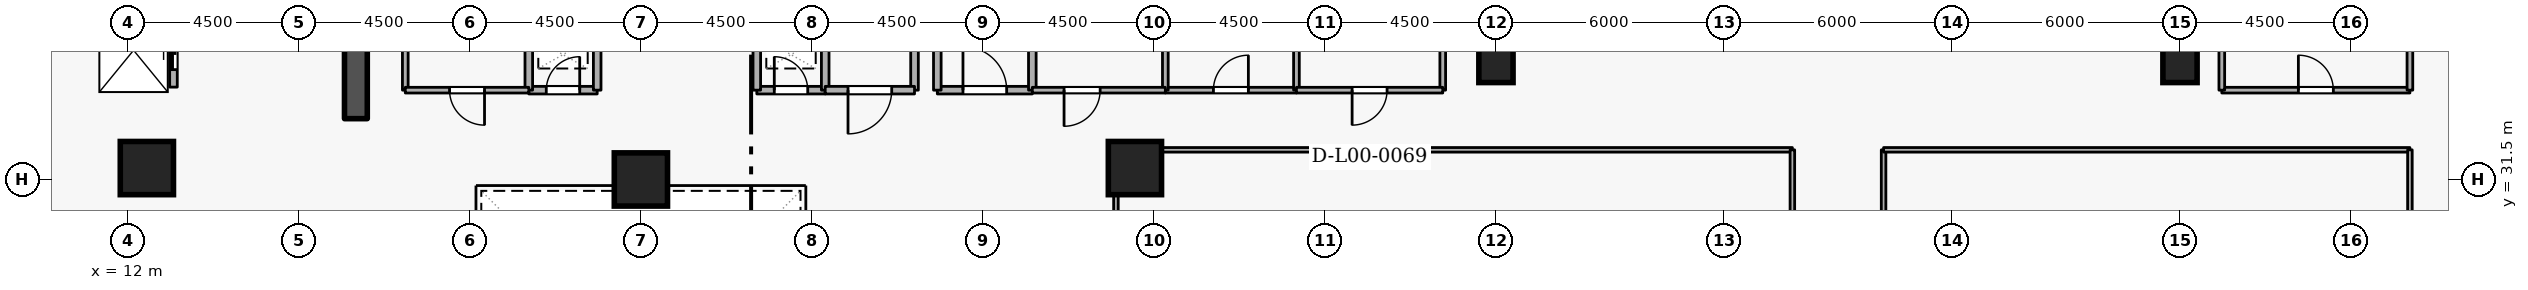
"""IFC4 building model, lengths in metres.
Left out: names, types, materials, properties, quantities, classifications, styles, units other than length and angle.
Written with IfcOpenShell. Run it as: python <this file> out.ifc"""

import sys

from ifc_helpers import new_model, si_unit, direction, frame, frame_2d, origin, origin_2d, place, context, subcontext, project, spatial, rectangle, extrude, element, fill, save


model = new_model("IFC4")
c1 = context("Model", 3, precision=1e-05, world=origin(), true_north=direction((0.0, 1.0)))
c2 = subcontext(c1, "Body", "Model", "MODEL_VIEW")
j1 = project(units=[si_unit("LENGTHUNIT", "METRE"), si_unit("PLANEANGLEUNIT", "RADIAN")], contexts=[c1])
p1 = place(None, origin())
s1 = spatial("IfcSite", under=j1, at=p1, CompositionType="ELEMENT")
p2 = place(p1, origin())
s2 = spatial("IfcBuilding", under=s1, at=p2, CompositionType="ELEMENT")
p3 = place(p2, origin())
s3 = spatial("IfcBuildingStorey", under=s2, at=p3, CompositionType="ELEMENT", Elevation=0.0)
p4 = place(p3, frame((18.0, 33.1, 0.0), z_axis=(0.0, 0.0, 1.0), x_axis=(0.0, 1.0, 0.0)))
e1 = element("IfcWall", 1, at=p4, inside=s3, PredefinedType="SHEAR", context=c2, shape_type="SweptSolid", body=[
    extrude(rectangle(XDim=5.7, YDim=0.6, at=frame_2d((2.85, 0.0))), origin(), (0.0, 0.0, 1.0), 4.8),
])
for number, where, z_axis, x_axis in (
    (2, (12.5, 31.8, 0.0), (0.0, 0.0, 1.0), (1.0, 0.0, 0.0)),
    (3, (38.5, 31.8, 0.0), (0.0, 0.0, 1.0), (1.0, 0.0, 0.0)),
    (4, (25.5, 31.5, 0.0), (0.0, 0.0, 1.0), (1.0, 0.0, 0.0)),
):
    element("IfcColumn", number, at=place(p3, frame(where, z_axis=z_axis, x_axis=x_axis)), inside=s3, PredefinedType="COLUMN", context=c2, shape_type="SweptSolid", body=[
        extrude(rectangle(XDim=1.4, YDim=1.4, at=origin_2d()), origin(), (0.0, 0.0, 1.0), 4.8),
    ])
for number, where, z_axis, x_axis in (
    (5, (48.0, 34.5, 0.0), (0.0, 0.0, 1.0), (1.0, 0.0, 0.0)),
    (6, (66.0, 34.5, 0.0), (0.0, 0.0, 1.0), (1.0, 0.0, 0.0)),
):
    element("IfcColumn", number, at=place(p3, frame(where, z_axis=z_axis, x_axis=x_axis)), inside=s3, PredefinedType="COLUMN", context=c2, shape_type="SweptSolid", body=[
        extrude(rectangle(XDim=0.9, YDim=0.9, at=origin_2d()), origin(), (0.0, 0.0, 1.0), 4.8),
    ])
p5 = place(p3, frame((13.2, 33.93, 0.0), z_axis=(0.0, 0.0, 1.0), x_axis=(0.0, 1.0, 0.0)))
e7 = element("IfcWall", 7, at=p5, inside=s3, PredefinedType="STANDARD", context=c2, shape_type="SweptSolid", body=[
    extrude(rectangle(XDim=1.94, YDim=0.2, at=frame_2d((0.97, 0.0))), origin(), (0.0, 0.0, 1.0), 4.46),
])
p6 = place(p5, frame((0.46, 0.0, 0.0)))
e8 = element("IfcOpeningElement", 8, at=p6, cuts=e7, PredefinedType="OPENING", context=c2, shape_type="SweptSolid", body=[
    extrude(rectangle(XDim=1.02, YDim=2.06, at=frame_2d((0.51, 1.03))), frame((0.0, 0.11, 0.0), z_axis=(0.0, -1.0, 0.0), x_axis=(1.0, 0.0, 0.0)), (0.0, 0.0, 1.0), 0.22),
])
p7 = place(p3, frame((33.3, 33.85, 0.0), z_axis=(0.0, 0.0, 1.0), x_axis=(1.0, 0.0, 0.0)))
e9 = element("IfcWall", 9, at=p7, inside=s3, PredefinedType="STANDARD", context=c2, shape_type="SweptSolid", body=[
    extrude(rectangle(XDim=2.5, YDim=0.2, at=frame_2d((1.25, 0.0))), origin(), (0.0, 0.0, 1.0), 4.46),
])
p8 = place(p7, frame((0.675, 0.0, 0.0)))
e10 = element("IfcOpeningElement", 10, at=p8, cuts=e9, PredefinedType="OPENING", context=c2, shape_type="SweptSolid", body=[
    extrude(rectangle(XDim=1.15, YDim=2.1, at=frame_2d((0.575, 1.05))), frame((0.0, 0.11, 0.0), z_axis=(0.0, -1.0, 0.0), x_axis=(1.0, 0.0, 0.0)), (0.0, 0.0, 1.0), 0.22),
])
p9 = place(p3, frame((35.8, 33.85, 0.0), z_axis=(0.0, 0.0, 1.0), x_axis=(0.0, 1.0, 0.0)))
e11 = element("IfcWall", 11, at=p9, inside=s3, PredefinedType="STANDARD", context=c2, shape_type="SweptSolid", body=[
    extrude(rectangle(XDim=5.15, YDim=0.2, at=frame_2d((2.575, 0.0))), origin(), (0.0, 0.0, 1.0), 4.46),
])
p10 = place(p3, frame((33.3, 35.6, 0.0), z_axis=(0.0, 0.0, 1.0), x_axis=(0.0, -1.0, 0.0)))
e12 = element("IfcWall", 12, at=p10, inside=s3, PredefinedType="STANDARD", context=c2, shape_type="SweptSolid", body=[
    extrude(rectangle(XDim=1.75, YDim=0.2, at=frame_2d((0.875, 0.0))), origin(), (0.0, 0.0, 1.0), 3.665),
])
p11 = place(p3, frame((22.55, 33.85, 0.0), z_axis=(0.0, 0.0, 1.0), x_axis=(1.0, 0.0, 0.0)))
e13 = element("IfcWall", 13, at=p11, inside=s3, PredefinedType="STANDARD", context=c2, shape_type="SweptSolid", body=[
    extrude(rectangle(XDim=1.8, YDim=0.2, at=frame_2d((0.9, 0.0))), origin(), (0.0, 0.0, 1.0), 4.46),
])
p12 = place(p11, frame((0.46, 0.0, 0.0)))
e14 = element("IfcOpeningElement", 14, at=p12, cuts=e13, PredefinedType="OPENING", context=c2, shape_type="SweptSolid", body=[
    extrude(rectangle(XDim=0.88, YDim=2.04, at=frame_2d((0.44, 1.02))), frame((0.0, 0.11, 0.0), z_axis=(0.0, -1.0, 0.0), x_axis=(1.0, 0.0, 0.0)), (0.0, 0.0, 1.0), 0.22),
])
for number, where, z_axis, x_axis in (
    (15, (24.35, 33.85, 0.0), (0.0, 0.0, 1.0), (0.0, 1.0, 0.0)),
    (16, (22.55, 35.35, 0.0), (0.0, 0.0, 1.0), (0.0, -1.0, 0.0)),
):
    element("IfcWall", number, at=place(p3, frame(where, z_axis=z_axis, x_axis=x_axis)), inside=s3, PredefinedType="STANDARD", context=c2, shape_type="SweptSolid", body=[
        extrude(rectangle(XDim=1.5, YDim=0.2, at=frame_2d((0.75, 0.0))), origin(), (0.0, 0.0, 1.0), 4.46),
    ])
p13 = place(p3, frame((28.55, 33.85, 0.0), z_axis=(0.0, 0.0, 1.0), x_axis=(1.0, 0.0, 0.0)))
e17 = element("IfcWall", 17, at=p13, inside=s3, PredefinedType="STANDARD", context=c2, shape_type="SweptSolid", body=[
    extrude(rectangle(XDim=1.8, YDim=0.2, at=frame_2d((0.9, 0.0))), origin(), (0.0, 0.0, 1.0), 4.46),
])
p14 = place(p13, frame((0.46, 0.0, 0.0)))
e18 = element("IfcOpeningElement", 18, at=p14, cuts=e17, PredefinedType="OPENING", context=c2, shape_type="SweptSolid", body=[
    extrude(rectangle(XDim=0.88, YDim=2.04, at=frame_2d((0.44, 1.02))), frame((0.0, 0.11, 0.0), z_axis=(0.0, -1.0, 0.0), x_axis=(1.0, 0.0, 0.0)), (0.0, 0.0, 1.0), 0.22),
])
for number, where, z_axis, x_axis in (
    (19, (30.35, 33.85, 0.0), (0.0, 0.0, 1.0), (0.0, 1.0, 0.0)),
    (20, (28.55, 35.35, 0.0), (0.0, 0.0, 1.0), (0.0, -1.0, 0.0)),
):
    element("IfcWall", number, at=place(p3, frame(where, z_axis=z_axis, x_axis=x_axis)), inside=s3, PredefinedType="STANDARD", context=c2, shape_type="SweptSolid", body=[
        extrude(rectangle(XDim=1.5, YDim=0.2, at=frame_2d((0.75, 0.0))), origin(), (0.0, 0.0, 1.0), 4.46),
    ])
p15 = place(p3, frame((32.7, 35.35, 0.0), z_axis=(0.0, 0.0, 1.0), x_axis=(0.0, -1.0, 0.0)))
e21 = element("IfcWall", 21, at=p15, inside=s3, PredefinedType="STANDARD", context=c2, shape_type="SweptSolid", body=[
    extrude(rectangle(XDim=1.5, YDim=0.2, at=frame_2d((0.75, 0.0))), origin(), (0.0, 0.0, 1.0), 3.665),
])
p16 = place(p3, frame((32.7, 33.85, 0.0), z_axis=(0.0, 0.0, 1.0), x_axis=(-1.0, 0.0, 0.0)))
e22 = element("IfcWall", 22, at=p16, inside=s3, PredefinedType="STANDARD", context=c2, shape_type="SweptSolid", body=[
    extrude(rectangle(XDim=2.35, YDim=0.2, at=frame_2d((1.175, 0.0))), origin(), (0.0, 0.0, 1.0), 4.46),
])
p17 = place(p16, frame((0.6, 0.0, 0.0)))
e23 = element("IfcOpeningElement", 23, at=p17, cuts=e22, PredefinedType="OPENING", context=c2, shape_type="SweptSolid", body=[
    extrude(rectangle(XDim=1.15, YDim=2.1, at=frame_2d((0.575, 1.05))), frame((0.0, 0.11, 0.0), z_axis=(0.0, -1.0, 0.0), x_axis=(1.0, 0.0, 0.0)), (0.0, 0.0, 1.0), 0.22),
])
p18 = place(p3, frame((19.3, 33.85, 0.0), z_axis=(0.0, 0.0, 1.0), x_axis=(0.0, 1.0, 0.0)))
e24 = element("IfcWall", 24, at=p18, inside=s3, PredefinedType="PARTITIONING", context=c2, shape_type="SweptSolid", body=[
    extrude(rectangle(XDim=1.5, YDim=0.15, at=frame_2d((0.75, 0.0))), origin(), (0.0, 0.0, 1.0), 4.46),
])
p19 = place(p3, frame((22.55, 33.85, 0.0), z_axis=(0.0, 0.0, 1.0), x_axis=(-1.0, 0.0, 0.0)))
e25 = element("IfcWall", 25, at=p19, inside=s3, PredefinedType="PARTITIONING", context=c2, shape_type="SweptSolid", body=[
    extrude(rectangle(XDim=3.25, YDim=0.15, at=frame_2d((1.625, 0.0))), origin(), (0.0, 0.0, 1.0), 4.46),
])
p20 = place(p19, frame((1.165, 0.0, 0.0)))
e26 = element("IfcOpeningElement", 26, at=p20, cuts=e25, PredefinedType="OPENING", context=c2, shape_type="SweptSolid", body=[
    extrude(rectangle(XDim=0.92, YDim=2.08, at=frame_2d((0.46, 1.04))), frame((0.0, 0.085, 0.0), z_axis=(0.0, -1.0, 0.0), x_axis=(1.0, 0.0, 0.0)), (0.0, 0.0, 1.0), 0.17),
])
p21 = place(p3, frame((39.3, 33.85, 0.0), z_axis=(0.0, 0.0, 1.0), x_axis=(1.0, 0.0, 0.0)))
e27 = element("IfcWall", 27, at=p21, inside=s3, PredefinedType="PARTITIONING", context=c2, shape_type="SweptSolid", body=[
    extrude(rectangle(XDim=3.45, YDim=0.15, at=frame_2d((1.725, 0.0))), origin(), (0.0, 0.0, 1.0), 4.46),
])
p22 = place(p21, frame((1.265, 0.0, 0.0)))
e28 = element("IfcOpeningElement", 28, at=p22, cuts=e27, PredefinedType="OPENING", context=c2, shape_type="SweptSolid", body=[
    extrude(rectangle(XDim=0.92, YDim=2.08, at=frame_2d((0.46, 1.04))), frame((0.0, 0.085, 0.0), z_axis=(0.0, -1.0, 0.0), x_axis=(1.0, 0.0, 0.0)), (0.0, 0.0, 1.0), 0.17),
])
p23 = place(p3, frame((42.75, 33.85, 0.0), z_axis=(0.0, 0.0, 1.0), x_axis=(0.0, 1.0, 0.0)))
e29 = element("IfcWall", 29, at=p23, inside=s3, PredefinedType="PARTITIONING", context=c2, shape_type="SweptSolid", body=[
    extrude(rectangle(XDim=3.95, YDim=0.15, at=frame_2d((1.975, 0.0))), origin(), (0.0, 0.0, 1.0), 3.538),
])
p24 = place(p3, frame((39.3, 37.8, 0.0), z_axis=(0.0, 0.0, 1.0), x_axis=(0.0, -1.0, 0.0)))
e30 = element("IfcWall", 30, at=p24, inside=s3, PredefinedType="PARTITIONING", context=c2, shape_type="SweptSolid", body=[
    extrude(rectangle(XDim=3.95, YDim=0.15, at=frame_2d((1.975, 0.0))), origin(), (0.0, 0.0, 1.0), 4.46),
])
p25 = place(p3, frame((67.1, 33.85, 0.0), z_axis=(0.0, 0.0, 1.0), x_axis=(1.0, 0.0, 0.0)))
e31 = element("IfcWall", 31, at=p25, inside=s3, PredefinedType="PARTITIONING", context=c2, shape_type="SweptSolid", body=[
    extrude(rectangle(XDim=4.95, YDim=0.15, at=frame_2d((2.475, 0.0))), origin(), (0.0, 0.0, 1.0), 4.46),
])
p26 = place(p25, frame((2.015, 0.0, 0.0)))
e32 = element("IfcOpeningElement", 32, at=p26, cuts=e31, PredefinedType="OPENING", context=c2, shape_type="SweptSolid", body=[
    extrude(rectangle(XDim=0.92, YDim=2.08, at=frame_2d((0.46, 1.04))), frame((0.0, 0.085, 0.0), z_axis=(0.0, -1.0, 0.0), x_axis=(1.0, 0.0, 0.0)), (0.0, 0.0, 1.0), 0.17),
])
for number, where, z_axis, x_axis in (
    (33, (72.05, 33.85, 0.0), (0.0, 0.0, 1.0), (0.0, 1.0, 0.0)),
    (34, (67.1, 37.8, 0.0), (0.0, 0.0, 1.0), (0.0, -1.0, 0.0)),
    (35, (46.6, 37.8, 0.0), (0.0, 0.0, 1.0), (0.0, -1.0, 0.0)),
):
    element("IfcWall", number, at=place(p3, frame(where, z_axis=z_axis, x_axis=x_axis)), inside=s3, PredefinedType="PARTITIONING", context=c2, shape_type="SweptSolid", body=[
        extrude(rectangle(XDim=3.95, YDim=0.15, at=frame_2d((1.975, 0.0))), origin(), (0.0, 0.0, 1.0), 4.46),
    ])
p27 = place(p3, frame((46.6, 33.85, 0.0), z_axis=(0.0, 0.0, 1.0), x_axis=(-1.0, 0.0, 0.0)))
e36 = element("IfcWall", 36, at=p27, inside=s3, PredefinedType="PARTITIONING", context=c2, shape_type="SweptSolid", body=[
    extrude(rectangle(XDim=3.85, YDim=0.15, at=frame_2d((1.925, 0.0))), origin(), (0.0, 0.0, 1.0), 4.46),
])
p28 = place(p27, frame((1.465, 0.0, 0.0)))
e37 = element("IfcOpeningElement", 37, at=p28, cuts=e36, PredefinedType="OPENING", context=c2, shape_type="SweptSolid", body=[
    extrude(rectangle(XDim=0.92, YDim=2.08, at=frame_2d((0.46, 1.04))), frame((0.0, 0.085, 0.0), z_axis=(0.0, -1.0, 0.0), x_axis=(1.0, 0.0, 0.0)), (0.0, 0.0, 1.0), 0.17),
])
p29 = place(p3, frame((38.0, 22.3, 0.0), z_axis=(0.0, 0.0, 1.0), x_axis=(0.0, 1.0, 0.0)))
e38 = element("IfcWall", 38, at=p29, inside=s3, PredefinedType="PARTITIONING", context=c2, shape_type="SweptSolid", body=[
    extrude(rectangle(XDim=9.98, YDim=0.12, at=frame_2d((4.99, 0.0))), origin(), (0.0, 0.0, 1.0), 4.46),
])
p30 = place(p3, frame((38.0, 32.28, 0.0), z_axis=(0.0, 0.0, 1.0), x_axis=(1.0, 0.0, 0.0)))
e39 = element("IfcWall", 39, at=p30, inside=s3, PredefinedType="PARTITIONING", context=c2, shape_type="SweptSolid", body=[
    extrude(rectangle(XDim=17.8, YDim=0.12, at=frame_2d((8.9, 0.0))), origin(), (0.0, 0.0, 1.0), 4.46),
])
for number, where, z_axis, x_axis in (
    (40, (55.8, 32.28, 0.0), (0.0, 0.0, 1.0), (0.0, -1.0, 0.0)),
    (41, (58.2, 22.3, 0.0), (0.0, 0.0, 1.0), (0.0, 1.0, 0.0)),
):
    element("IfcWall", number, at=place(p3, frame(where, z_axis=z_axis, x_axis=x_axis)), inside=s3, PredefinedType="PARTITIONING", context=c2, shape_type="SweptSolid", body=[
        extrude(rectangle(XDim=9.98, YDim=0.12, at=frame_2d((4.99, 0.0))), origin(), (0.0, 0.0, 1.0), 4.46),
    ])
p31 = place(p3, frame((58.2, 32.28, 0.0), z_axis=(0.0, 0.0, 1.0), x_axis=(1.0, 0.0, 0.0)))
e42 = element("IfcWall", 42, at=p31, inside=s3, PredefinedType="PARTITIONING", context=c2, shape_type="SweptSolid", body=[
    extrude(rectangle(XDim=13.85, YDim=0.12, at=frame_2d((6.925, 0.0))), origin(), (0.0, 0.0, 1.0), 4.46),
])
p32 = place(p3, frame((72.05, 32.28, 0.0), z_axis=(0.0, 0.0, 1.0), x_axis=(0.0, -1.0, 0.0)))
e43 = element("IfcWall", 43, at=p32, inside=s3, PredefinedType="PARTITIONING", context=c2, shape_type="SweptSolid", body=[
    extrude(rectangle(XDim=9.98, YDim=0.12, at=frame_2d((4.99, 0.0))), origin(), (0.0, 0.0, 1.0), 4.46),
])
p33 = place(p3, frame((39.3, 33.85, 0.0), z_axis=(0.0, 0.0, 1.0), x_axis=(-1.0, 0.0, 0.0)))
e44 = element("IfcWall", 44, at=p33, inside=s3, PredefinedType="PARTITIONING", context=c2, shape_type="SweptSolid", body=[
    extrude(rectangle(XDim=3.5, YDim=0.15, at=frame_2d((1.75, 0.0))), origin(), (0.0, 0.0, 1.0), 4.46),
])
p34 = place(p33, frame((1.715, 0.0, 0.0)))
e45 = element("IfcOpeningElement", 45, at=p34, cuts=e44, PredefinedType="OPENING", context=c2, shape_type="SweptSolid", body=[
    extrude(rectangle(XDim=0.95, YDim=2.1, at=frame_2d((0.475, 1.05))), frame((0.0, 0.085, 0.0), z_axis=(0.0, -1.0, 0.0), x_axis=(1.0, 0.0, 0.0)), (0.0, 0.0, 1.0), 0.17),
])
p35 = place(p6, origin())
e46 = element("IfcDoor", 46, at=p35, inside=s3, OperationType="SLIDING_TO_LEFT", PredefinedType="DOOR", context=c2, shape_type="SweptSolid", body=[
    extrude(rectangle(XDim=1.02, YDim=2.06, at=frame_2d((0.51, 1.03))), frame((0.0, 0.025, 0.0), z_axis=(0.0, -1.0, 0.0), x_axis=(1.0, 0.0, 0.0)), (0.0, 0.0, 1.0), 0.05),
])
fill(e8, e46)
p36 = place(p8, origin())
e47 = element("IfcDoor", 47, at=p36, inside=s3, OperationType="SINGLE_SWING_LEFT", PredefinedType="DOOR", context=c2, shape_type="SweptSolid", body=[
    extrude(rectangle(XDim=1.15, YDim=2.1, at=frame_2d((0.575, 1.05))), frame((0.0, 0.025, 0.0), z_axis=(0.0, -1.0, 0.0), x_axis=(1.0, 0.0, 0.0)), (0.0, 0.0, 1.0), 0.05),
])
fill(e10, e47)
p37 = place(p12, origin())
e48 = element("IfcDoor", 48, at=p37, inside=s3, OperationType="SINGLE_SWING_RIGHT", PredefinedType="DOOR", context=c2, shape_type="SweptSolid", body=[
    extrude(rectangle(XDim=0.88, YDim=2.04, at=frame_2d((0.44, 1.02))), frame((0.0, 0.025, 0.0), z_axis=(0.0, -1.0, 0.0), x_axis=(1.0, 0.0, 0.0)), (0.0, 0.0, 1.0), 0.05),
])
fill(e14, e48)
p38 = place(p14, origin())
e49 = element("IfcDoor", 49, at=p38, inside=s3, OperationType="SINGLE_SWING_LEFT", PredefinedType="DOOR", context=c2, shape_type="SweptSolid", body=[
    extrude(rectangle(XDim=0.88, YDim=2.04, at=frame_2d((0.44, 1.02))), frame((0.0, 0.025, 0.0), z_axis=(0.0, -1.0, 0.0), x_axis=(1.0, 0.0, 0.0)), (0.0, 0.0, 1.0), 0.05),
])
fill(e18, e49)
p39 = place(p20, origin())
e50 = element("IfcDoor", 50, at=p39, inside=s3, OperationType="SINGLE_SWING_LEFT", PredefinedType="DOOR", context=c2, shape_type="SweptSolid", body=[
    extrude(rectangle(XDim=0.92, YDim=2.08, at=frame_2d((0.46, 1.04))), frame((0.0, 0.025, 0.0), z_axis=(0.0, -1.0, 0.0), x_axis=(1.0, 0.0, 0.0)), (0.0, 0.0, 1.0), 0.05),
])
fill(e26, e50)
p40 = place(p17, origin())
e51 = element("IfcDoor", 51, at=p40, inside=s3, OperationType="SINGLE_SWING_RIGHT", PredefinedType="DOOR", context=c2, shape_type="SweptSolid", body=[
    extrude(rectangle(XDim=1.15, YDim=2.1, at=frame_2d((0.575, 1.05))), frame((0.0, 0.025, 0.0), z_axis=(0.0, -1.0, 0.0), x_axis=(1.0, 0.0, 0.0)), (0.0, 0.0, 1.0), 0.05),
])
fill(e23, e51)
p41 = place(p22, origin())
e52 = element("IfcDoor", 52, at=p41, inside=s3, OperationType="SINGLE_SWING_RIGHT", PredefinedType="DOOR", context=c2, shape_type="SweptSolid", body=[
    extrude(rectangle(XDim=0.92, YDim=2.08, at=frame_2d((0.46, 1.04))), frame((0.0, 0.025, 0.0), z_axis=(0.0, -1.0, 0.0), x_axis=(1.0, 0.0, 0.0)), (0.0, 0.0, 1.0), 0.05),
])
fill(e28, e52)
p42 = place(p26, origin())
e53 = element("IfcDoor", 53, at=p42, inside=s3, OperationType="SINGLE_SWING_LEFT", PredefinedType="DOOR", context=c2, shape_type="SweptSolid", body=[
    extrude(rectangle(XDim=0.92, YDim=2.08, at=frame_2d((0.46, 1.04))), frame((0.0, 0.025, 0.0), z_axis=(0.0, -1.0, 0.0), x_axis=(1.0, 0.0, 0.0)), (0.0, 0.0, 1.0), 0.05),
])
fill(e32, e53)
p43 = place(p28, origin())
e54 = element("IfcDoor", 54, at=p43, inside=s3, OperationType="SINGLE_SWING_RIGHT", PredefinedType="DOOR", context=c2, shape_type="SweptSolid", body=[
    extrude(rectangle(XDim=0.92, YDim=2.08, at=frame_2d((0.46, 1.04))), frame((0.0, 0.025, 0.0), z_axis=(0.0, -1.0, 0.0), x_axis=(1.0, 0.0, 0.0)), (0.0, 0.0, 1.0), 0.05),
])
fill(e37, e54)
p44 = place(p34, origin())
e55 = element("IfcDoor", 55, at=p44, inside=s3, OperationType="SINGLE_SWING_RIGHT", PredefinedType="DOOR", context=c2, shape_type="SweptSolid", body=[
    extrude(rectangle(XDim=0.95, YDim=2.1, at=frame_2d((0.475, 1.05))), frame((0.0, 0.025, 0.0), z_axis=(0.0, -1.0, 0.0), x_axis=(1.0, 0.0, 0.0)), (0.0, 0.0, 1.0), 0.05),
])
fill(e45, e55)
save(model, sys.argv[1])
